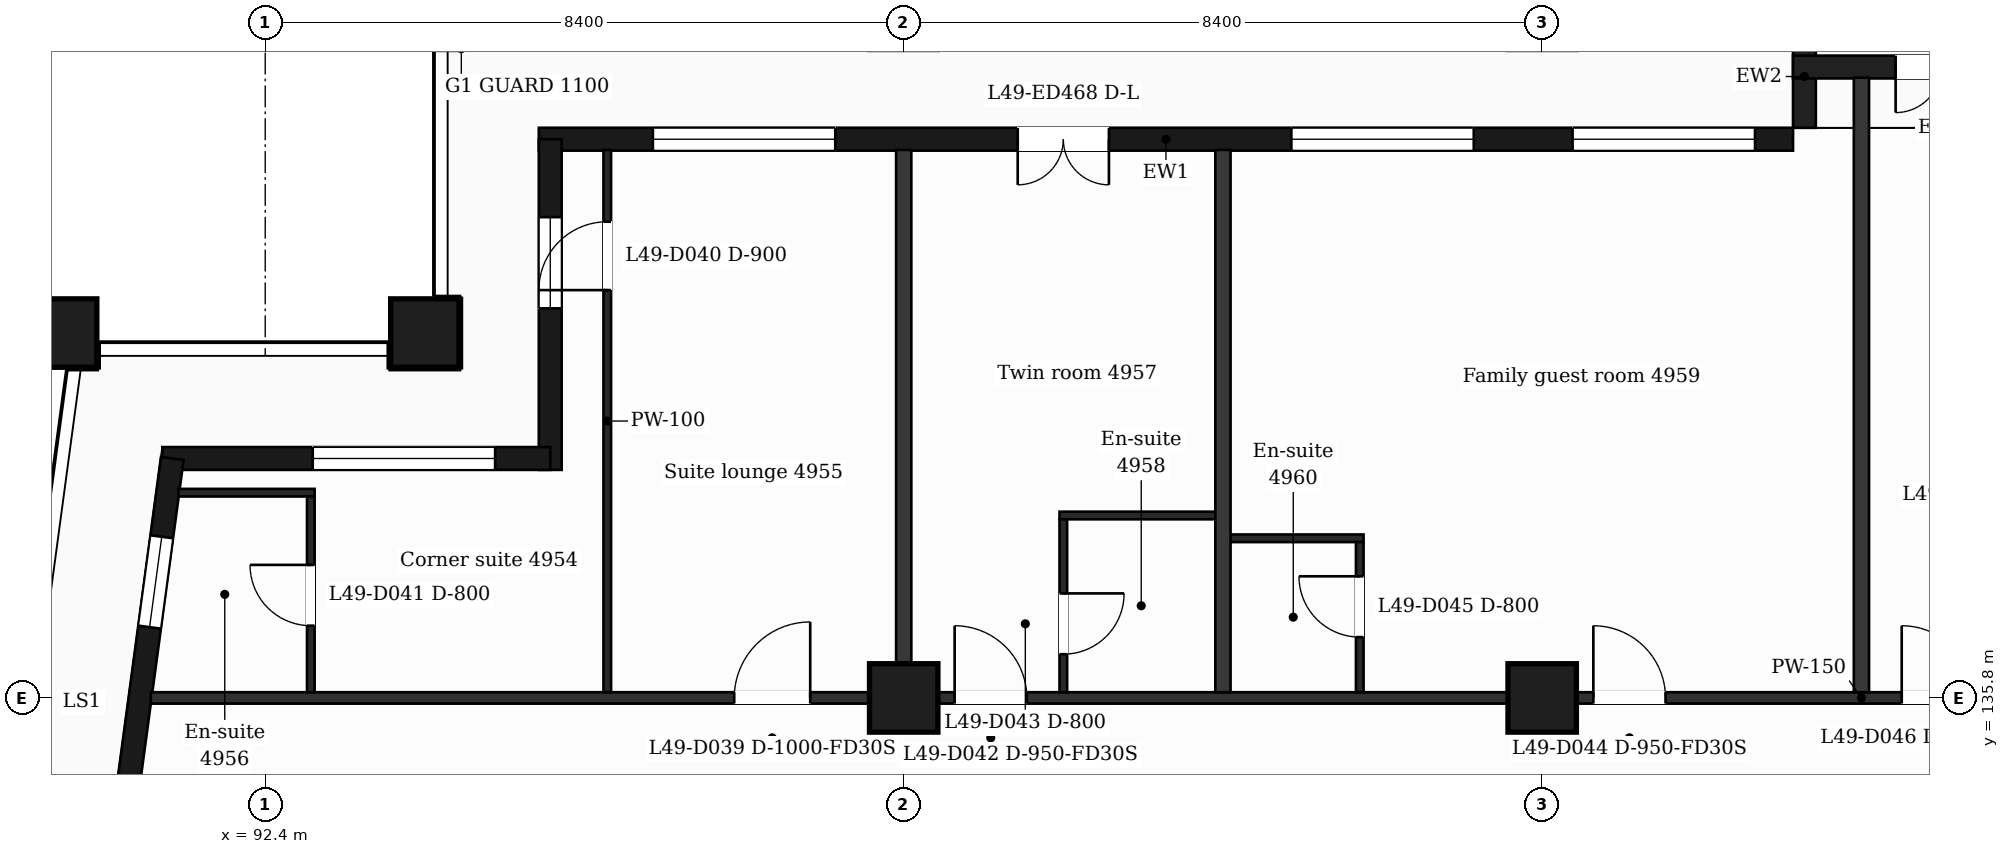
"""IFC4 building model, lengths in metres.
Left out: names, types, materials, properties, quantities, classifications, styles, units other than length and angle.
Written with IfcOpenShell. Run it as: python <this file> out.ifc"""

import sys

from ifc_helpers import new_model, si_unit, direction, frame, frame_2d, origin, origin_2d, place, context, subcontext, project, spatial, rectangle, extrude, element, fill, save


model = new_model("IFC4")
c1 = context("Model", 3, precision=1e-05, world=origin(), true_north=direction((0.0, 1.0)))
c2 = subcontext(c1, "Body", "Model", "MODEL_VIEW")
j1 = project(units=[si_unit("LENGTHUNIT", "METRE"), si_unit("PLANEANGLEUNIT", "RADIAN")], contexts=[c1])
p1 = place(None, origin())
s1 = spatial("IfcSite", under=j1, at=p1, CompositionType="ELEMENT")
p2 = place(p1, origin())
s2 = spatial("IfcBuilding", under=s1, at=p2, CompositionType="ELEMENT")
p3 = place(p2, frame((0.0, 0.0, 205.9)))
s3 = spatial("IfcBuildingStorey", under=s2, at=p3, CompositionType="ELEMENT", Elevation=205.9)
for number, where, z_axis, x_axis in (
    (1, (94.5, 140.6, 0.0), (0.0, 0.0, 1.0), (1.0, 0.0, 0.0)),
    (2, (89.735, 140.6, 0.0), (0.0, 0.0, 1.0), (1.0, 0.0, 0.0)),
    (3, (100.8, 135.8, 0.0), (0.0, 0.0, 1.0), (1.0, 0.0, 0.0)),
    (4, (109.2, 135.8, 0.0), (0.0, 0.0, 1.0), (1.0, 0.0, 0.0)),
):
    element("IfcColumn", number, at=place(p3, frame(where, z_axis=z_axis, x_axis=x_axis)), inside=s3, PredefinedType="COLUMN", context=c2, shape_type="SweptSolid", body=[
        extrude(rectangle(XDim=0.9, YDim=0.9, at=origin_2d()), origin(), (0.0, 0.0, 1.0), 3.7),
    ])
p4 = place(p3, frame((112.5, 143.15, 0.0), z_axis=(0.0, 0.0, 1.0), x_axis=(-1.0, 0.0, 0.0)))
e5 = element("IfcWall", 5, at=p4, inside=s3, PredefinedType="SOLIDWALL", context=c2, shape_type="SweptSolid", body=[
    extrude(rectangle(XDim=16.5, YDim=0.3, at=frame_2d((8.25, 0.0))), origin(), (0.0, 0.0, 1.0), 3.38),
])
p5 = place(p4, frame((0.5, 0.0, 0.9)))
e6 = element("IfcOpeningElement", 6, at=p5, cuts=e5, PredefinedType="OPENING", context=c2, shape_type="SweptSolid", body=[
    extrude(rectangle(XDim=2.4, YDim=2.1, at=frame_2d((1.2, 1.05))), frame((0.0, 0.16, 0.0), z_axis=(0.0, -1.0, 0.0), x_axis=(1.0, 0.0, 0.0)), (0.0, 0.0, 1.0), 0.32),
])
p6 = place(p4, frame((4.2, 0.0, 0.9)))
e7 = element("IfcOpeningElement", 7, at=p6, cuts=e5, PredefinedType="OPENING", context=c2, shape_type="SweptSolid", body=[
    extrude(rectangle(XDim=2.4, YDim=2.1, at=frame_2d((1.2, 1.05))), frame((0.0, 0.16, 0.0), z_axis=(0.0, -1.0, 0.0), x_axis=(1.0, 0.0, 0.0)), (0.0, 0.0, 1.0), 0.32),
])
p7 = place(p4, frame((9.0, 0.0, 0.0)))
e8 = element("IfcOpeningElement", 8, at=p7, cuts=e5, PredefinedType="OPENING", context=c2, shape_type="SweptSolid", body=[
    extrude(rectangle(XDim=1.2, YDim=2.4, at=frame_2d((0.6, 1.2))), frame((0.0, 0.16, 0.0), z_axis=(0.0, -1.0, 0.0), x_axis=(1.0, 0.0, 0.0)), (0.0, 0.0, 1.0), 0.32),
])
p8 = place(p4, frame((12.6, 0.0, 0.9)))
e9 = element("IfcOpeningElement", 9, at=p8, cuts=e5, PredefinedType="OPENING", context=c2, shape_type="SweptSolid", body=[
    extrude(rectangle(XDim=2.4, YDim=2.1, at=frame_2d((1.2, 1.05))), frame((0.0, 0.16, 0.0), z_axis=(0.0, -1.0, 0.0), x_axis=(1.0, 0.0, 0.0)), (0.0, 0.0, 1.0), 0.32),
])
p9 = place(p3, frame((112.65, 143.3, 0.0), z_axis=(0.0, 0.0, 1.0), x_axis=(0.0, 1.0, 0.0)))
e10 = element("IfcWall", 10, at=p9, inside=s3, PredefinedType="SOLIDWALL", context=c2, shape_type="SweptSolid", body=[
    extrude(rectangle(XDim=1.35, YDim=0.3, at=frame_2d((0.675, 0.0))), origin(), (0.0, 0.0, 1.0), 3.38),
])
p10 = place(p3, frame((116.4, 144.1, 0.0), z_axis=(0.0, 0.0, 1.0), x_axis=(-1.0, 0.0, 0.0)))
e11 = element("IfcWall", 11, at=p10, inside=s3, PredefinedType="SOLIDWALL", context=c2, shape_type="SweptSolid", body=[
    extrude(rectangle(XDim=3.9, YDim=0.3, at=frame_2d((1.95, 0.0))), origin(), (0.0, 0.0, 1.0), 3.38),
])
p11 = place(p10, frame((1.35, 0.0, 0.0)))
e12 = element("IfcOpeningElement", 12, at=p11, cuts=e11, PredefinedType="OPENING", context=c2, shape_type="SweptSolid", body=[
    extrude(rectangle(XDim=1.2, YDim=2.4, at=frame_2d((0.6, 1.2))), frame((0.0, 0.16, 0.0), z_axis=(0.0, -1.0, 0.0), x_axis=(1.0, 0.0, 0.0)), (0.0, 0.0, 1.0), 0.32),
])
p12 = place(p3, frame((96.15, 143.15, 0.0), z_axis=(0.0, 0.0, 1.0), x_axis=(0.0, -1.0, 0.0)))
e13 = element("IfcWall", 13, at=p12, inside=s3, PredefinedType="SOLIDWALL", context=c2, shape_type="SweptSolid", body=[
    extrude(rectangle(XDim=4.35, YDim=0.3, at=frame_2d((2.175, 0.0))), origin(), (0.0, 0.0, 1.0), 3.38),
])
p13 = place(p12, frame((1.025, 0.0, 0.9)))
e14 = element("IfcOpeningElement", 14, at=p13, cuts=e13, PredefinedType="OPENING", context=c2, shape_type="SweptSolid", body=[
    extrude(rectangle(XDim=1.2, YDim=2.1, at=frame_2d((0.6, 1.05))), frame((0.0, 0.16, 0.0), z_axis=(0.0, -1.0, 0.0), x_axis=(1.0, 0.0, 0.0)), (0.0, 0.0, 1.0), 0.32),
])
p14 = place(p3, frame((96.15, 138.95, 0.0), z_axis=(0.0, 0.0, 1.0), x_axis=(-1.0, 0.0, 0.0)))
e15 = element("IfcWall", 15, at=p14, inside=s3, PredefinedType="SOLIDWALL", context=c2, shape_type="SweptSolid", body=[
    extrude(rectangle(XDim=5.104, YDim=0.3, at=frame_2d((2.552, 0.0))), origin(), (0.0, 0.0, 1.0), 3.38),
])
p15 = place(p14, frame((0.725, 0.0, 0.9)))
e16 = element("IfcOpeningElement", 16, at=p15, cuts=e15, PredefinedType="OPENING", context=c2, shape_type="SweptSolid", body=[
    extrude(rectangle(XDim=2.4, YDim=2.1, at=frame_2d((1.2, 1.05))), frame((0.0, 0.16, 0.0), z_axis=(0.0, -1.0, 0.0), x_axis=(1.0, 0.0, 0.0)), (0.0, 0.0, 1.0), 0.32),
])
p16 = place(p3, frame((91.177, 138.95, 0.0), z_axis=(0.0, 0.0, 1.0), x_axis=(-0.133426664613, -0.991058689065, 0.0)))
e17 = element("IfcWall", 17, at=p16, inside=s3, PredefinedType="SOLIDWALL", context=c2, shape_type="SweptSolid", body=[
    extrude(rectangle(XDim=6.609, YDim=0.3, at=frame_2d((3.305, 0.0))), origin(), (0.0, 0.0, 1.0), 3.38),
])
p17 = place(p16, frame((1.039, 0.0, 0.9)))
e18 = element("IfcOpeningElement", 18, at=p17, cuts=e17, PredefinedType="OPENING", context=c2, shape_type="SweptSolid", body=[
    extrude(rectangle(XDim=1.2, YDim=2.1, at=frame_2d((0.6, 1.05))), frame((0.0, 0.16, 0.0), z_axis=(0.0, -1.0, 0.0), x_axis=(1.0, 0.0, 0.0)), (0.0, 0.0, 1.0), 0.32),
])
p18 = place(p16, frame((4.294, 0.0, 0.0)))
e19 = element("IfcOpeningElement", 19, at=p18, cuts=e17, PredefinedType="OPENING", context=c2, shape_type="SweptSolid", body=[
    extrude(rectangle(XDim=1.2, YDim=2.4, at=frame_2d((0.6, 1.2))), frame((0.0, 0.16, 0.0), z_axis=(0.0, -1.0, 0.0), x_axis=(1.0, 0.0, 0.0)), (0.0, 0.0, 1.0), 0.32),
])
p19 = place(p3, frame((90.895, 135.8, 0.0), z_axis=(0.0, 0.0, 1.0), x_axis=(1.0, 0.0, 0.0)))
e20 = element("IfcWall", 20, at=p19, inside=s3, PredefinedType="PARTITIONING", context=c2, shape_type="SweptSolid", body=[
    extrude(rectangle(XDim=45.011, YDim=0.15, at=frame_2d((22.505, 0.0))), origin(), (0.0, 0.0, 1.0), 3.38),
])
p20 = place(p19, frame((7.675, 0.0, 0.0)))
e21 = element("IfcOpeningElement", 21, at=p20, cuts=e20, PredefinedType="OPENING", context=c2, shape_type="SweptSolid", body=[
    extrude(rectangle(XDim=1.0, YDim=2.1, at=frame_2d((0.5, 1.05))), frame((0.0, 0.085, 0.0), z_axis=(0.0, -1.0, 0.0), x_axis=(1.0, 0.0, 0.0)), (0.0, 0.0, 1.0), 0.17),
])
p21 = place(p19, frame((10.575, 0.0, 0.0)))
e22 = element("IfcOpeningElement", 22, at=p21, cuts=e20, PredefinedType="OPENING", context=c2, shape_type="SweptSolid", body=[
    extrude(rectangle(XDim=0.95, YDim=2.1, at=frame_2d((0.475, 1.05))), frame((0.0, 0.085, 0.0), z_axis=(0.0, -1.0, 0.0), x_axis=(1.0, 0.0, 0.0)), (0.0, 0.0, 1.0), 0.17),
])
p22 = place(p19, frame((18.979, 0.0, 0.0)))
e23 = element("IfcOpeningElement", 23, at=p22, cuts=e20, PredefinedType="OPENING", context=c2, shape_type="SweptSolid", body=[
    extrude(rectangle(XDim=0.95, YDim=2.1, at=frame_2d((0.475, 1.05))), frame((0.0, 0.085, 0.0), z_axis=(0.0, -1.0, 0.0), x_axis=(1.0, 0.0, 0.0)), (0.0, 0.0, 1.0), 0.17),
])
p23 = place(p19, frame((23.035, 0.0, 0.0)))
e24 = element("IfcOpeningElement", 24, at=p23, cuts=e20, PredefinedType="OPENING", context=c2, shape_type="SweptSolid", body=[
    extrude(rectangle(XDim=0.95, YDim=2.1, at=frame_2d((0.475, 1.05))), frame((0.0, 0.085, 0.0), z_axis=(0.0, -1.0, 0.0), x_axis=(1.0, 0.0, 0.0)), (0.0, 0.0, 1.0), 0.17),
])
p24 = place(p19, frame((29.23, 0.0, 0.0)))
e25 = element("IfcOpeningElement", 25, at=p24, cuts=e20, PredefinedType="OPENING", context=c2, shape_type="SweptSolid", body=[
    extrude(rectangle(XDim=0.95, YDim=2.1, at=frame_2d((0.475, 1.05))), frame((0.0, 0.085, 0.0), z_axis=(0.0, -1.0, 0.0), x_axis=(1.0, 0.0, 0.0)), (0.0, 0.0, 1.0), 0.17),
])
p25 = place(p19, frame((31.367, 0.0, 0.0)))
e26 = element("IfcOpeningElement", 26, at=p25, cuts=e20, PredefinedType="OPENING", context=c2, shape_type="SweptSolid", body=[
    extrude(rectangle(XDim=0.95, YDim=2.1, at=frame_2d((0.475, 1.05))), frame((0.0, 0.085, 0.0), z_axis=(0.0, -1.0, 0.0), x_axis=(1.0, 0.0, 0.0)), (0.0, 0.0, 1.0), 0.17),
])
p26 = place(p19, frame((36.906, 0.0, 0.0)))
e27 = element("IfcOpeningElement", 27, at=p26, cuts=e20, PredefinedType="OPENING", context=c2, shape_type="SweptSolid", body=[
    extrude(rectangle(XDim=1.0, YDim=2.1, at=frame_2d((0.5, 1.05))), frame((0.0, 0.085, 0.0), z_axis=(0.0, -1.0, 0.0), x_axis=(1.0, 0.0, 0.0)), (0.0, 0.0, 1.0), 0.17),
])
p27 = place(p3, frame((105.0, 137.9, 0.0), z_axis=(0.0, 0.0, 1.0), x_axis=(1.0, 0.0, 0.0)))
e28 = element("IfcWall", 28, at=p27, inside=s3, PredefinedType="PARTITIONING", context=c2, shape_type="SweptSolid", body=[
    extrude(rectangle(XDim=1.85, YDim=0.1, at=frame_2d((0.925, 0.0))), origin(), (0.0, 0.0, 1.0), 3.38),
])
p28 = place(p3, frame((102.85, 138.2, 0.0), z_axis=(0.0, 0.0, 1.0), x_axis=(1.0, 0.0, 0.0)))
e29 = element("IfcWall", 29, at=p28, inside=s3, PredefinedType="PARTITIONING", context=c2, shape_type="SweptSolid", body=[
    extrude(rectangle(XDim=2.15, YDim=0.1, at=frame_2d((1.075, 0.0))), origin(), (0.0, 0.0, 1.0), 3.38),
])
p29 = place(p3, frame((91.258, 138.5, 0.0), z_axis=(0.0, 0.0, 1.0), x_axis=(1.0, 0.0, 0.0)))
e30 = element("IfcWall", 30, at=p29, inside=s3, PredefinedType="PARTITIONING", context=c2, shape_type="SweptSolid", body=[
    extrude(rectangle(XDim=1.792, YDim=0.1, at=frame_2d((0.896, 0.0))), origin(), (0.0, 0.0, 1.0), 3.38),
])
p30 = place(p3, frame((93.0, 135.875, 0.0), z_axis=(0.0, 0.0, 1.0), x_axis=(0.0, 1.0, 0.0)))
e31 = element("IfcWall", 31, at=p30, inside=s3, PredefinedType="PARTITIONING", context=c2, shape_type="SweptSolid", body=[
    extrude(rectangle(XDim=2.575, YDim=0.1, at=frame_2d((1.288, 0.0))), origin(), (0.0, 0.0, 1.0), 3.38),
])
p31 = place(p30, frame((0.875, 0.0, 0.0)))
e32 = element("IfcOpeningElement", 32, at=p31, cuts=e31, PredefinedType="OPENING", context=c2, shape_type="SweptSolid", body=[
    extrude(rectangle(XDim=0.8, YDim=2.1, at=frame_2d((0.4, 1.05))), frame((0.0, 0.06, 0.0), z_axis=(0.0, -1.0, 0.0), x_axis=(1.0, 0.0, 0.0)), (0.0, 0.0, 1.0), 0.12),
])
p32 = place(p3, frame((96.9, 135.875, 0.0), z_axis=(0.0, 0.0, 1.0), x_axis=(0.0, 1.0, 0.0)))
e33 = element("IfcWall", 33, at=p32, inside=s3, PredefinedType="PARTITIONING", context=c2, shape_type="SweptSolid", body=[
    extrude(rectangle(XDim=7.135, YDim=0.1, at=frame_2d((3.567, 0.0))), origin(), (0.0, 0.0, 1.0), 3.38),
])
p33 = place(p32, frame((5.29, 0.0, 0.0)))
e34 = element("IfcOpeningElement", 34, at=p33, cuts=e33, PredefinedType="OPENING", context=c2, shape_type="SweptSolid", body=[
    extrude(rectangle(XDim=0.9, YDim=2.1, at=frame_2d((0.45, 1.05))), frame((0.0, 0.06, 0.0), z_axis=(0.0, -1.0, 0.0), x_axis=(1.0, 0.0, 0.0)), (0.0, 0.0, 1.0), 0.12),
])
p34 = place(p3, frame((100.8, 135.875, 0.0), z_axis=(0.0, 0.0, 1.0), x_axis=(0.0, 1.0, 0.0)))
e35 = element("IfcWall", 35, at=p34, inside=s3, PredefinedType="PARTITIONING", context=c2, shape_type="SweptSolid", body=[
    extrude(rectangle(XDim=7.135, YDim=0.2, at=frame_2d((3.567, 0.0))), origin(), (0.0, 0.0, 1.0), 3.38),
])
p35 = place(p3, frame((102.9, 135.875, 0.0), z_axis=(0.0, 0.0, 1.0), x_axis=(0.0, 1.0, 0.0)))
e36 = element("IfcWall", 36, at=p35, inside=s3, PredefinedType="PARTITIONING", context=c2, shape_type="SweptSolid", body=[
    extrude(rectangle(XDim=2.275, YDim=0.1, at=frame_2d((1.137, 0.0))), origin(), (0.0, 0.0, 1.0), 3.38),
])
p36 = place(p35, frame((0.5, 0.0, 0.0)))
e37 = element("IfcOpeningElement", 37, at=p36, cuts=e36, PredefinedType="OPENING", context=c2, shape_type="SweptSolid", body=[
    extrude(rectangle(XDim=0.8, YDim=2.1, at=frame_2d((0.4, 1.05))), frame((0.0, 0.06, 0.0), z_axis=(0.0, -1.0, 0.0), x_axis=(1.0, 0.0, 0.0)), (0.0, 0.0, 1.0), 0.12),
])
p37 = place(p3, frame((105.0, 135.875, 0.0), z_axis=(0.0, 0.0, 1.0), x_axis=(0.0, 1.0, 0.0)))
e38 = element("IfcWall", 38, at=p37, inside=s3, PredefinedType="PARTITIONING", context=c2, shape_type="SweptSolid", body=[
    extrude(rectangle(XDim=7.135, YDim=0.2, at=frame_2d((3.567, 0.0))), origin(), (0.0, 0.0, 1.0), 3.38),
])
p38 = place(p3, frame((106.8, 135.875, 0.0), z_axis=(0.0, 0.0, 1.0), x_axis=(0.0, 1.0, 0.0)))
e39 = element("IfcWall", 39, at=p38, inside=s3, PredefinedType="PARTITIONING", context=c2, shape_type="SweptSolid", body=[
    extrude(rectangle(XDim=1.975, YDim=0.1, at=frame_2d((0.988, 0.0))), origin(), (0.0, 0.0, 1.0), 3.38),
])
p39 = place(p38, frame((0.725, 0.0, 0.0)))
e40 = element("IfcOpeningElement", 40, at=p39, cuts=e39, PredefinedType="OPENING", context=c2, shape_type="SweptSolid", body=[
    extrude(rectangle(XDim=0.8, YDim=2.1, at=frame_2d((0.4, 1.05))), frame((0.0, 0.06, 0.0), z_axis=(0.0, -1.0, 0.0), x_axis=(1.0, 0.0, 0.0)), (0.0, 0.0, 1.0), 0.12),
])
p40 = place(p3, frame((113.4, 135.875, 0.0), z_axis=(0.0, 0.0, 1.0), x_axis=(0.0, 1.0, 0.0)))
e41 = element("IfcWall", 41, at=p40, inside=s3, PredefinedType="PARTITIONING", context=c2, shape_type="SweptSolid", body=[
    extrude(rectangle(XDim=8.085, YDim=0.2, at=frame_2d((4.042, 0.0))), origin(), (0.0, 0.0, 1.0), 3.38),
])
p41 = place(p5, origin())
e42 = element("IfcWindow", 42, at=p41, inside=s3, PartitioningType="SINGLE_PANEL", PredefinedType="WINDOW", context=c2, shape_type="SweptSolid", body=[
    extrude(rectangle(XDim=2.4, YDim=2.1, at=frame_2d((1.2, 1.05))), frame((0.0, 0.03, 0.0), z_axis=(0.0, -1.0, 0.0), x_axis=(1.0, 0.0, 0.0)), (0.0, 0.0, 1.0), 0.06),
])
fill(e6, e42)
p42 = place(p6, origin())
e43 = element("IfcWindow", 43, at=p42, inside=s3, PartitioningType="SINGLE_PANEL", PredefinedType="WINDOW", context=c2, shape_type="SweptSolid", body=[
    extrude(rectangle(XDim=2.4, YDim=2.1, at=frame_2d((1.2, 1.05))), frame((0.0, 0.03, 0.0), z_axis=(0.0, -1.0, 0.0), x_axis=(1.0, 0.0, 0.0)), (0.0, 0.0, 1.0), 0.06),
])
fill(e7, e43)
p43 = place(p7, origin())
e44 = element("IfcDoor", 44, at=p43, inside=s3, OperationType="DOUBLE_DOOR_SINGLE_SWING", PredefinedType="DOOR", context=c2, shape_type="SweptSolid", body=[
    extrude(rectangle(XDim=1.2, YDim=2.4, at=frame_2d((0.6, 1.2))), frame((0.0, 0.025, 0.0), z_axis=(0.0, -1.0, 0.0), x_axis=(1.0, 0.0, 0.0)), (0.0, 0.0, 1.0), 0.05),
])
fill(e8, e44)
p44 = place(p8, origin())
e45 = element("IfcWindow", 45, at=p44, inside=s3, PartitioningType="SINGLE_PANEL", PredefinedType="WINDOW", context=c2, shape_type="SweptSolid", body=[
    extrude(rectangle(XDim=2.4, YDim=2.1, at=frame_2d((1.2, 1.05))), frame((0.0, 0.03, 0.0), z_axis=(0.0, -1.0, 0.0), x_axis=(1.0, 0.0, 0.0)), (0.0, 0.0, 1.0), 0.06),
])
fill(e9, e45)
p45 = place(p11, origin())
e46 = element("IfcDoor", 46, at=p45, inside=s3, OperationType="DOUBLE_DOOR_SINGLE_SWING", PredefinedType="DOOR", context=c2, shape_type="SweptSolid", body=[
    extrude(rectangle(XDim=1.2, YDim=2.4, at=frame_2d((0.6, 1.2))), frame((0.0, 0.025, 0.0), z_axis=(0.0, -1.0, 0.0), x_axis=(1.0, 0.0, 0.0)), (0.0, 0.0, 1.0), 0.05),
])
fill(e12, e46)
p46 = place(p13, origin())
e47 = element("IfcWindow", 47, at=p46, inside=s3, PartitioningType="SINGLE_PANEL", PredefinedType="WINDOW", context=c2, shape_type="SweptSolid", body=[
    extrude(rectangle(XDim=1.2, YDim=2.1, at=frame_2d((0.6, 1.05))), frame((0.0, 0.03, 0.0), z_axis=(0.0, -1.0, 0.0), x_axis=(1.0, 0.0, 0.0)), (0.0, 0.0, 1.0), 0.06),
])
fill(e14, e47)
p47 = place(p15, origin())
e48 = element("IfcWindow", 48, at=p47, inside=s3, PartitioningType="SINGLE_PANEL", PredefinedType="WINDOW", context=c2, shape_type="SweptSolid", body=[
    extrude(rectangle(XDim=2.4, YDim=2.1, at=frame_2d((1.2, 1.05))), frame((0.0, 0.03, 0.0), z_axis=(0.0, -1.0, 0.0), x_axis=(1.0, 0.0, 0.0)), (0.0, 0.0, 1.0), 0.06),
])
fill(e16, e48)
p48 = place(p17, origin())
e49 = element("IfcWindow", 49, at=p48, inside=s3, PartitioningType="SINGLE_PANEL", PredefinedType="WINDOW", context=c2, shape_type="SweptSolid", body=[
    extrude(rectangle(XDim=1.2, YDim=2.1, at=frame_2d((0.6, 1.05))), frame((0.0, 0.03, 0.0), z_axis=(0.0, -1.0, 0.0), x_axis=(1.0, 0.0, 0.0)), (0.0, 0.0, 1.0), 0.06),
])
fill(e18, e49)
p49 = place(p20, origin())
e50 = element("IfcDoor", 50, at=p49, inside=s3, OperationType="SINGLE_SWING_RIGHT", PredefinedType="DOOR", context=c2, shape_type="SweptSolid", body=[
    extrude(rectangle(XDim=1.0, YDim=2.1, at=frame_2d((0.5, 1.05))), frame((0.0, 0.025, 0.0), z_axis=(0.0, -1.0, 0.0), x_axis=(1.0, 0.0, 0.0)), (0.0, 0.0, 1.0), 0.05),
])
fill(e21, e50)
p50 = place(p33, origin())
e51 = element("IfcDoor", 51, at=p50, inside=s3, OperationType="SINGLE_SWING_LEFT", PredefinedType="DOOR", context=c2, shape_type="SweptSolid", body=[
    extrude(rectangle(XDim=0.9, YDim=2.1, at=frame_2d((0.45, 1.05))), frame((0.0, 0.025, 0.0), z_axis=(0.0, -1.0, 0.0), x_axis=(1.0, 0.0, 0.0)), (0.0, 0.0, 1.0), 0.05),
])
fill(e34, e51)
p51 = place(p31, origin())
e52 = element("IfcDoor", 52, at=p51, inside=s3, OperationType="SINGLE_SWING_RIGHT", PredefinedType="DOOR", context=c2, shape_type="SweptSolid", body=[
    extrude(rectangle(XDim=0.8, YDim=2.1, at=frame_2d((0.4, 1.05))), frame((0.0, 0.025, 0.0), z_axis=(0.0, -1.0, 0.0), x_axis=(1.0, 0.0, 0.0)), (0.0, 0.0, 1.0), 0.05),
])
fill(e32, e52)
p52 = place(p21, origin())
e53 = element("IfcDoor", 53, at=p52, inside=s3, OperationType="SINGLE_SWING_LEFT", PredefinedType="DOOR", context=c2, shape_type="SweptSolid", body=[
    extrude(rectangle(XDim=0.95, YDim=2.1, at=frame_2d((0.475, 1.05))), frame((0.0, 0.025, 0.0), z_axis=(0.0, -1.0, 0.0), x_axis=(1.0, 0.0, 0.0)), (0.0, 0.0, 1.0), 0.05),
])
fill(e22, e53)
p53 = place(p36, origin())
e54 = element("IfcDoor", 54, at=p53, inside=s3, OperationType="SINGLE_SWING_RIGHT", PredefinedType="DOOR", context=c2, shape_type="SweptSolid", body=[
    extrude(rectangle(XDim=0.8, YDim=2.1, at=frame_2d((0.4, 1.05))), frame((0.0, 0.025, 0.0), z_axis=(0.0, -1.0, 0.0), x_axis=(1.0, 0.0, 0.0)), (0.0, 0.0, 1.0), 0.05),
])
fill(e37, e54)
p54 = place(p22, origin())
e55 = element("IfcDoor", 55, at=p54, inside=s3, OperationType="SINGLE_SWING_LEFT", PredefinedType="DOOR", context=c2, shape_type="SweptSolid", body=[
    extrude(rectangle(XDim=0.95, YDim=2.1, at=frame_2d((0.475, 1.05))), frame((0.0, 0.025, 0.0), z_axis=(0.0, -1.0, 0.0), x_axis=(1.0, 0.0, 0.0)), (0.0, 0.0, 1.0), 0.05),
])
fill(e23, e55)
p55 = place(p39, origin())
e56 = element("IfcDoor", 56, at=p55, inside=s3, OperationType="SINGLE_SWING_RIGHT", PredefinedType="DOOR", context=c2, shape_type="SweptSolid", body=[
    extrude(rectangle(XDim=0.8, YDim=2.1, at=frame_2d((0.4, 1.05))), frame((0.0, 0.025, 0.0), z_axis=(0.0, -1.0, 0.0), x_axis=(1.0, 0.0, 0.0)), (0.0, 0.0, 1.0), 0.05),
])
fill(e40, e56)
p56 = place(p23, origin())
e57 = element("IfcDoor", 57, at=p56, inside=s3, OperationType="SINGLE_SWING_LEFT", PredefinedType="DOOR", context=c2, shape_type="SweptSolid", body=[
    extrude(rectangle(XDim=0.95, YDim=2.1, at=frame_2d((0.475, 1.05))), frame((0.0, 0.025, 0.0), z_axis=(0.0, -1.0, 0.0), x_axis=(1.0, 0.0, 0.0)), (0.0, 0.0, 1.0), 0.05),
])
fill(e24, e57)
save(model, sys.argv[1])
